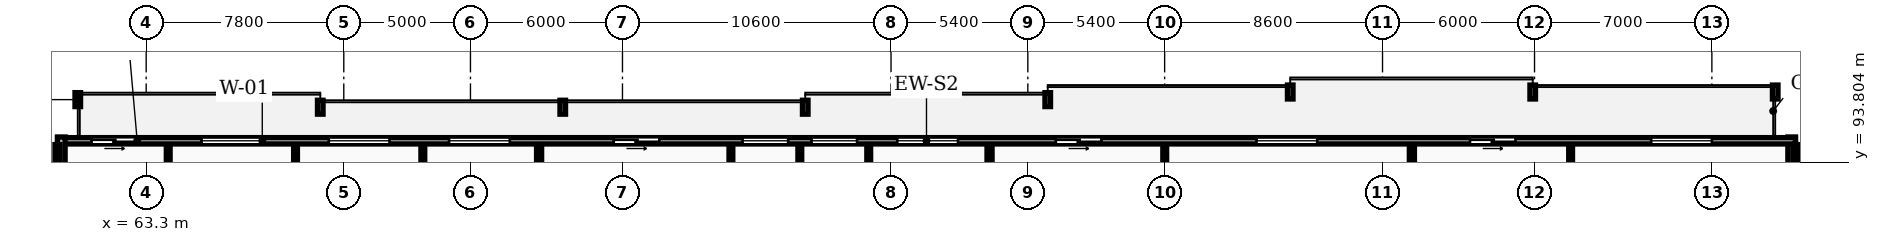
"""IFC4 building model, lengths in metres.
Left out: names, types, materials, properties, quantities, classifications, styles, units other than length and angle.
Written with IfcOpenShell. Run it as: python <this file> out.ifc"""

import sys

from ifc_helpers import new_model, si_unit, direction, frame, frame_2d, origin, place, context, subcontext, project, spatial, rectangle, extrude, element, fill, save


model = new_model("IFC4")
c1 = context("Model", 3, precision=1e-05, world=origin(), true_north=direction((0.0, 1.0)))
c2 = subcontext(c1, "Body", "Model", "MODEL_VIEW")
j1 = project(units=[si_unit("LENGTHUNIT", "METRE"), si_unit("PLANEANGLEUNIT", "RADIAN")], contexts=[c1])
p1 = place(None, origin())
s1 = spatial("IfcSite", under=j1, at=p1, CompositionType="ELEMENT")
p2 = place(p1, origin())
s2 = spatial("IfcBuilding", under=s1, at=p2, CompositionType="ELEMENT")
p3 = place(p2, frame((0.0, 0.0, 249.35)))
s3 = spatial("IfcBuildingStorey", under=s2, at=p3, CompositionType="ELEMENT", Elevation=249.35)
p4 = place(p3, frame((128.25, 91.2, 0.0), z_axis=(0.0, 0.0, 1.0), x_axis=(0.0, 1.0, 0.0)))
e1 = element("IfcWall", 1, at=p4, inside=s3, PredefinedType="STANDARD", context=c2, shape_type="SweptSolid", body=[
    extrude(rectangle(XDim=3.6, YDim=0.3, at=frame_2d((1.8, 0.0))), origin(), (0.0, 0.0, 1.0), 3.17),
])
p5 = place(p3, frame((128.4, 94.65, 0.0), z_axis=(0.0, 0.0, 1.0), x_axis=(-1.0, 0.0, 0.0)))
e2 = element("IfcWall", 2, at=p5, inside=s3, PredefinedType="STANDARD", context=c2, shape_type="SweptSolid", body=[
    extrude(rectangle(XDim=68.6, YDim=0.25, at=frame_2d((34.3, 0.0))), origin(), (0.0, 0.0, 1.0), 3.17),
])
p6 = place(p5, frame((60.518, 0.0, 0.85)))
e3 = element("IfcOpeningElement", 3, at=p6, cuts=e2, PredefinedType="OPENING", context=c2, shape_type="SweptSolid", body=[
    extrude(rectangle(XDim=2.4, YDim=1.9, at=frame_2d((1.2, 0.95))), frame((0.0, 0.135, 0.0), z_axis=(0.0, -1.0, 0.0), x_axis=(1.0, 0.0, 0.0)), (0.0, 0.0, 1.0), 0.27),
])
p7 = place(p5, frame((55.492, 0.0, 0.85)))
e4 = element("IfcOpeningElement", 4, at=p7, cuts=e2, PredefinedType="OPENING", context=c2, shape_type="SweptSolid", body=[
    extrude(rectangle(XDim=2.4, YDim=1.9, at=frame_2d((1.2, 0.95))), frame((0.0, 0.135, 0.0), z_axis=(0.0, -1.0, 0.0), x_axis=(1.0, 0.0, 0.0)), (0.0, 0.0, 1.0), 0.27),
])
p8 = place(p5, frame((65.455, 0.0, 0.0)))
e5 = element("IfcOpeningElement", 5, at=p8, cuts=e2, PredefinedType="OPENING", context=c2, shape_type="SweptSolid", body=[
    extrude(rectangle(XDim=1.8, YDim=2.2, at=frame_2d((0.9, 1.1))), frame((0.0, 0.135, 0.0), z_axis=(0.0, -1.0, 0.0), x_axis=(1.0, 0.0, 0.0)), (0.0, 0.0, 1.0), 0.27),
])
p9 = place(p5, frame((50.746, 0.0, 0.85)))
e6 = element("IfcOpeningElement", 6, at=p9, cuts=e2, PredefinedType="OPENING", context=c2, shape_type="SweptSolid", body=[
    extrude(rectangle(XDim=2.4, YDim=1.9, at=frame_2d((1.2, 0.95))), frame((0.0, 0.135, 0.0), z_axis=(0.0, -1.0, 0.0), x_axis=(1.0, 0.0, 0.0)), (0.0, 0.0, 1.0), 0.27),
])
p10 = place(p5, frame((39.76, 0.0, 0.85)))
e7 = element("IfcOpeningElement", 7, at=p10, cuts=e2, PredefinedType="OPENING", context=c2, shape_type="SweptSolid", body=[
    extrude(rectangle(XDim=1.8, YDim=1.8, at=frame_2d((0.9, 0.9))), frame((0.0, 0.135, 0.0), z_axis=(0.0, -1.0, 0.0), x_axis=(1.0, 0.0, 0.0)), (0.0, 0.0, 1.0), 0.27),
])
p11 = place(p5, frame((37.04, 0.0, 0.85)))
e8 = element("IfcOpeningElement", 8, at=p11, cuts=e2, PredefinedType="OPENING", context=c2, shape_type="SweptSolid", body=[
    extrude(rectangle(XDim=1.8, YDim=1.8, at=frame_2d((0.9, 0.9))), frame((0.0, 0.135, 0.0), z_axis=(0.0, -1.0, 0.0), x_axis=(1.0, 0.0, 0.0)), (0.0, 0.0, 1.0), 0.27),
])
p12 = place(p5, frame((44.845, 0.0, 0.0)))
e9 = element("IfcOpeningElement", 9, at=p12, cuts=e2, PredefinedType="OPENING", context=c2, shape_type="SweptSolid", body=[
    extrude(rectangle(XDim=1.8, YDim=2.2, at=frame_2d((0.9, 1.1))), frame((0.0, 0.135, 0.0), z_axis=(0.0, -1.0, 0.0), x_axis=(1.0, 0.0, 0.0)), (0.0, 0.0, 1.0), 0.27),
])
p13 = place(p5, frame((33.056, 0.0, 0.85)))
e10 = element("IfcOpeningElement", 10, at=p13, cuts=e2, PredefinedType="OPENING", context=c2, shape_type="SweptSolid", body=[
    extrude(rectangle(XDim=2.4, YDim=1.9, at=frame_2d((1.2, 0.95))), frame((0.0, 0.135, 0.0), z_axis=(0.0, -1.0, 0.0), x_axis=(1.0, 0.0, 0.0)), (0.0, 0.0, 1.0), 0.27),
])
p14 = place(p5, frame((27.394, 0.0, 0.0)))
e11 = element("IfcOpeningElement", 11, at=p14, cuts=e2, PredefinedType="OPENING", context=c2, shape_type="SweptSolid", body=[
    extrude(rectangle(XDim=1.8, YDim=2.2, at=frame_2d((0.9, 1.1))), frame((0.0, 0.135, 0.0), z_axis=(0.0, -1.0, 0.0), x_axis=(1.0, 0.0, 0.0)), (0.0, 0.0, 1.0), 0.27),
])
p15 = place(p5, frame((18.879, 0.0, 0.85)))
e12 = element("IfcOpeningElement", 12, at=p15, cuts=e2, PredefinedType="OPENING", context=c2, shape_type="SweptSolid", body=[
    extrude(rectangle(XDim=2.4, YDim=1.9, at=frame_2d((1.2, 0.95))), frame((0.0, 0.135, 0.0), z_axis=(0.0, -1.0, 0.0), x_axis=(1.0, 0.0, 0.0)), (0.0, 0.0, 1.0), 0.27),
])
p16 = place(p5, frame((11.048, 0.0, 0.0)))
e13 = element("IfcOpeningElement", 13, at=p16, cuts=e2, PredefinedType="OPENING", context=c2, shape_type="SweptSolid", body=[
    extrude(rectangle(XDim=1.8, YDim=2.2, at=frame_2d((0.9, 1.1))), frame((0.0, 0.135, 0.0), z_axis=(0.0, -1.0, 0.0), x_axis=(1.0, 0.0, 0.0)), (0.0, 0.0, 1.0), 0.27),
])
p17 = place(p5, frame((3.298, 0.0, 0.85)))
e14 = element("IfcOpeningElement", 14, at=p17, cuts=e2, PredefinedType="OPENING", context=c2, shape_type="SweptSolid", body=[
    extrude(rectangle(XDim=2.4, YDim=1.9, at=frame_2d((1.2, 0.95))), frame((0.0, 0.135, 0.0), z_axis=(0.0, -1.0, 0.0), x_axis=(1.0, 0.0, 0.0)), (0.0, 0.0, 1.0), 0.27),
])
p18 = place(p3, frame((59.95, 94.8, 0.0), z_axis=(0.0, 0.0, 1.0), x_axis=(0.0, -1.0, 0.0)))
e15 = element("IfcWall", 15, at=p18, inside=s3, PredefinedType="STANDARD", context=c2, shape_type="SweptSolid", body=[
    extrude(rectangle(XDim=3.6, YDim=0.3, at=frame_2d((1.8, 0.0))), origin(), (0.0, 0.0, 1.0), 3.17),
])
for number, where, z_axis, x_axis in (
    (16, (59.8, 70.18, 0.0), (0.0, 0.0, 1.0), (0.0, 1.0, 0.0)),
    (17, (128.4, 70.18, 0.0), (0.0, 0.0, 1.0), (0.0, 1.0, 0.0)),
):
    element("IfcWall", number, at=place(p3, frame(where, z_axis=z_axis, x_axis=x_axis)), inside=s3, PredefinedType="PARTITIONING", context=c2, shape_type="SweptSolid", body=[
        extrude(rectangle(XDim=24.32, YDim=0.2, at=frame_2d((12.16, 0.0))), origin(), (0.0, 0.0, 1.0), 2.477),
    ])
p19 = place(p3, frame((78.809, 70.18, 0.0), z_axis=(0.0, 0.0, 1.0), x_axis=(0.0, 1.0, 0.0)))
e18 = element("IfcWall", 18, at=p19, inside=s3, PredefinedType="PARTITIONING", context=c2, shape_type="SweptSolid", body=[
    extrude(rectangle(XDim=24.32, YDim=0.2, at=frame_2d((12.16, 0.0))), origin(), (0.0, 0.0, 1.0), 3.17),
])
p20 = place(p3, frame((69.195, 90.03, 0.0), z_axis=(0.0, 0.0, 1.0), x_axis=(0.0, 1.0, 0.0)))
e19 = element("IfcWall", 19, at=p20, inside=s3, PredefinedType="PARTITIONING", context=c2, shape_type="SweptSolid", body=[
    extrude(rectangle(XDim=4.47, YDim=0.15, at=frame_2d((2.235, 0.0))), origin(), (0.0, 0.0, 1.0), 3.17),
])
p21 = place(p3, frame((64.17, 84.89, 0.0), z_axis=(0.0, 0.0, 1.0), x_axis=(0.0, 1.0, 0.0)))
e20 = element("IfcWall", 20, at=p21, inside=s3, PredefinedType="PARTITIONING", context=c2, shape_type="SweptSolid", body=[
    extrude(rectangle(XDim=9.61, YDim=0.15, at=frame_2d((4.805, 0.0))), origin(), (0.0, 0.0, 1.0), 3.17),
])
p22 = place(p21, frame((3.82, 0.0, 0.0)))
e21 = element("IfcOpeningElement", 21, at=p22, cuts=e20, PredefinedType="OPENING", context=c2, shape_type="SweptSolid", body=[
    extrude(rectangle(XDim=0.92, YDim=2.08, at=frame_2d((0.46, 1.04))), frame((0.0, 0.085, 0.0), z_axis=(0.0, -1.0, 0.0), x_axis=(1.0, 0.0, 0.0)), (0.0, 0.0, 1.0), 0.17),
])
p23 = place(p3, frame((74.22, 87.51, 0.0), z_axis=(0.0, 0.0, 1.0), x_axis=(0.0, 1.0, 0.0)))
e22 = element("IfcWall", 22, at=p23, inside=s3, PredefinedType="PARTITIONING", context=c2, shape_type="SweptSolid", body=[
    extrude(rectangle(XDim=6.99, YDim=0.15, at=frame_2d((3.495, 0.0))), origin(), (0.0, 0.0, 1.0), 3.17),
])
p24 = place(p23, frame((1.2, 0.0, 0.0)))
e23 = element("IfcOpeningElement", 23, at=p24, cuts=e22, PredefinedType="OPENING", context=c2, shape_type="SweptSolid", body=[
    extrude(rectangle(XDim=0.92, YDim=2.08, at=frame_2d((0.46, 1.04))), frame((0.0, 0.085, 0.0), z_axis=(0.0, -1.0, 0.0), x_axis=(1.0, 0.0, 0.0)), (0.0, 0.0, 1.0), 0.17),
])
p25 = place(p3, frame((96.589, 70.18, 0.0), z_axis=(0.0, 0.0, 1.0), x_axis=(0.0, 1.0, 0.0)))
e24 = element("IfcWall", 24, at=p25, inside=s3, PredefinedType="PARTITIONING", context=c2, shape_type="SweptSolid", body=[
    extrude(rectangle(XDim=24.32, YDim=0.2, at=frame_2d((12.16, 0.0))), origin(), (0.0, 0.0, 1.0), 3.17),
])
p26 = place(p3, frame((89.1, 90.03, 0.0), z_axis=(0.0, 0.0, 1.0), x_axis=(0.0, 1.0, 0.0)))
e25 = element("IfcWall", 25, at=p26, inside=s3, PredefinedType="PARTITIONING", context=c2, shape_type="SweptSolid", body=[
    extrude(rectangle(XDim=4.47, YDim=0.15, at=frame_2d((2.235, 0.0))), origin(), (0.0, 0.0, 1.0), 3.17),
])
p27 = place(p3, frame((86.38, 84.89, 0.0), z_axis=(0.0, 0.0, 1.0), x_axis=(0.0, 1.0, 0.0)))
e26 = element("IfcWall", 26, at=p27, inside=s3, PredefinedType="PARTITIONING", context=c2, shape_type="SweptSolid", body=[
    extrude(rectangle(XDim=9.61, YDim=0.15, at=frame_2d((4.805, 0.0))), origin(), (0.0, 0.0, 1.0), 3.17),
])
p28 = place(p27, frame((3.82, 0.0, 0.0)))
e27 = element("IfcOpeningElement", 27, at=p28, cuts=e26, PredefinedType="OPENING", context=c2, shape_type="SweptSolid", body=[
    extrude(rectangle(XDim=0.92, YDim=2.08, at=frame_2d((0.46, 1.04))), frame((0.0, 0.085, 0.0), z_axis=(0.0, -1.0, 0.0), x_axis=(1.0, 0.0, 0.0)), (0.0, 0.0, 1.0), 0.17),
])
p29 = place(p3, frame((91.82, 87.4, 0.0), z_axis=(0.0, 0.0, 1.0), x_axis=(0.0, 1.0, 0.0)))
e28 = element("IfcWall", 28, at=p29, inside=s3, PredefinedType="PARTITIONING", context=c2, shape_type="SweptSolid", body=[
    extrude(rectangle(XDim=7.1, YDim=0.15, at=frame_2d((3.55, 0.0))), origin(), (0.0, 0.0, 1.0), 3.17),
])
p30 = place(p29, frame((1.31, 0.0, 0.0)))
e29 = element("IfcOpeningElement", 29, at=p30, cuts=e28, PredefinedType="OPENING", context=c2, shape_type="SweptSolid", body=[
    extrude(rectangle(XDim=0.92, YDim=2.08, at=frame_2d((0.46, 1.04))), frame((0.0, 0.085, 0.0), z_axis=(0.0, -1.0, 0.0), x_axis=(1.0, 0.0, 0.0)), (0.0, 0.0, 1.0), 0.17),
])
p31 = place(p3, frame((113.259, 70.18, 0.0), z_axis=(0.0, 0.0, 1.0), x_axis=(0.0, 1.0, 0.0)))
e30 = element("IfcWall", 30, at=p31, inside=s3, PredefinedType="PARTITIONING", context=c2, shape_type="SweptSolid", body=[
    extrude(rectangle(XDim=24.32, YDim=0.2, at=frame_2d((12.16, 0.0))), origin(), (0.0, 0.0, 1.0), 3.17),
])
for number, where, z_axis, x_axis in (
    (31, (103.504, 90.03, 0.0), (0.0, 0.0, 1.0), (0.0, 1.0, 0.0)),
    (32, (119.524, 90.03, 0.0), (0.0, 0.0, 1.0), (0.0, 1.0, 0.0)),
):
    element("IfcWall", number, at=place(p3, frame(where, z_axis=z_axis, x_axis=x_axis)), inside=s3, PredefinedType="PARTITIONING", context=c2, shape_type="SweptSolid", body=[
        extrude(rectangle(XDim=4.47, YDim=0.15, at=frame_2d((2.235, 0.0))), origin(), (0.0, 0.0, 1.0), 3.17),
    ])
p32 = place(p6, origin())
e33 = element("IfcWindow", 33, at=p32, inside=s3, PartitioningType="DOUBLE_PANEL_VERTICAL", PredefinedType="WINDOW", context=c2, shape_type="SweptSolid", body=[
    extrude(rectangle(XDim=2.4, YDim=1.9, at=frame_2d((1.2, 0.95))), frame((0.0, 0.03, 0.0), z_axis=(0.0, -1.0, 0.0), x_axis=(1.0, 0.0, 0.0)), (0.0, 0.0, 1.0), 0.06),
])
fill(e3, e33)
p33 = place(p7, origin())
e34 = element("IfcWindow", 34, at=p33, inside=s3, PartitioningType="DOUBLE_PANEL_VERTICAL", PredefinedType="WINDOW", context=c2, shape_type="SweptSolid", body=[
    extrude(rectangle(XDim=2.4, YDim=1.9, at=frame_2d((1.2, 0.95))), frame((0.0, 0.03, 0.0), z_axis=(0.0, -1.0, 0.0), x_axis=(1.0, 0.0, 0.0)), (0.0, 0.0, 1.0), 0.06),
])
fill(e4, e34)
p34 = place(p8, origin())
e35 = element("IfcDoor", 35, at=p34, inside=s3, OperationType="SLIDING_TO_LEFT", PredefinedType="DOOR", context=c2, shape_type="SweptSolid", body=[
    extrude(rectangle(XDim=1.8, YDim=2.2, at=frame_2d((0.9, 1.1))), frame((0.0, 0.025, 0.0), z_axis=(0.0, -1.0, 0.0), x_axis=(1.0, 0.0, 0.0)), (0.0, 0.0, 1.0), 0.05),
])
fill(e5, e35)
p35 = place(p9, origin())
e36 = element("IfcWindow", 36, at=p35, inside=s3, PartitioningType="DOUBLE_PANEL_VERTICAL", PredefinedType="WINDOW", context=c2, shape_type="SweptSolid", body=[
    extrude(rectangle(XDim=2.4, YDim=1.9, at=frame_2d((1.2, 0.95))), frame((0.0, 0.03, 0.0), z_axis=(0.0, -1.0, 0.0), x_axis=(1.0, 0.0, 0.0)), (0.0, 0.0, 1.0), 0.06),
])
fill(e6, e36)
p36 = place(p10, origin())
e37 = element("IfcWindow", 37, at=p36, inside=s3, PartitioningType="SINGLE_PANEL", PredefinedType="WINDOW", context=c2, shape_type="SweptSolid", body=[
    extrude(rectangle(XDim=1.8, YDim=1.8, at=frame_2d((0.9, 0.9))), frame((0.0, 0.03, 0.0), z_axis=(0.0, -1.0, 0.0), x_axis=(1.0, 0.0, 0.0)), (0.0, 0.0, 1.0), 0.06),
])
fill(e7, e37)
p37 = place(p11, origin())
e38 = element("IfcWindow", 38, at=p37, inside=s3, PartitioningType="SINGLE_PANEL", PredefinedType="WINDOW", context=c2, shape_type="SweptSolid", body=[
    extrude(rectangle(XDim=1.8, YDim=1.8, at=frame_2d((0.9, 0.9))), frame((0.0, 0.03, 0.0), z_axis=(0.0, -1.0, 0.0), x_axis=(1.0, 0.0, 0.0)), (0.0, 0.0, 1.0), 0.06),
])
fill(e8, e38)
p38 = place(p12, origin())
e39 = element("IfcDoor", 39, at=p38, inside=s3, OperationType="SLIDING_TO_LEFT", PredefinedType="DOOR", context=c2, shape_type="SweptSolid", body=[
    extrude(rectangle(XDim=1.8, YDim=2.2, at=frame_2d((0.9, 1.1))), frame((0.0, 0.025, 0.0), z_axis=(0.0, -1.0, 0.0), x_axis=(1.0, 0.0, 0.0)), (0.0, 0.0, 1.0), 0.05),
])
fill(e9, e39)
p39 = place(p13, origin())
e40 = element("IfcWindow", 40, at=p39, inside=s3, PartitioningType="DOUBLE_PANEL_VERTICAL", PredefinedType="WINDOW", context=c2, shape_type="SweptSolid", body=[
    extrude(rectangle(XDim=2.4, YDim=1.9, at=frame_2d((1.2, 0.95))), frame((0.0, 0.03, 0.0), z_axis=(0.0, -1.0, 0.0), x_axis=(1.0, 0.0, 0.0)), (0.0, 0.0, 1.0), 0.06),
])
fill(e10, e40)
p40 = place(p14, origin())
e41 = element("IfcDoor", 41, at=p40, inside=s3, OperationType="SLIDING_TO_LEFT", PredefinedType="DOOR", context=c2, shape_type="SweptSolid", body=[
    extrude(rectangle(XDim=1.8, YDim=2.2, at=frame_2d((0.9, 1.1))), frame((0.0, 0.025, 0.0), z_axis=(0.0, -1.0, 0.0), x_axis=(1.0, 0.0, 0.0)), (0.0, 0.0, 1.0), 0.05),
])
fill(e11, e41)
p41 = place(p15, origin())
e42 = element("IfcWindow", 42, at=p41, inside=s3, PartitioningType="DOUBLE_PANEL_VERTICAL", PredefinedType="WINDOW", context=c2, shape_type="SweptSolid", body=[
    extrude(rectangle(XDim=2.4, YDim=1.9, at=frame_2d((1.2, 0.95))), frame((0.0, 0.03, 0.0), z_axis=(0.0, -1.0, 0.0), x_axis=(1.0, 0.0, 0.0)), (0.0, 0.0, 1.0), 0.06),
])
fill(e12, e42)
p42 = place(p16, origin())
e43 = element("IfcDoor", 43, at=p42, inside=s3, OperationType="SLIDING_TO_LEFT", PredefinedType="DOOR", context=c2, shape_type="SweptSolid", body=[
    extrude(rectangle(XDim=1.8, YDim=2.2, at=frame_2d((0.9, 1.1))), frame((0.0, 0.025, 0.0), z_axis=(0.0, -1.0, 0.0), x_axis=(1.0, 0.0, 0.0)), (0.0, 0.0, 1.0), 0.05),
])
fill(e13, e43)
p43 = place(p17, origin())
e44 = element("IfcWindow", 44, at=p43, inside=s3, PartitioningType="DOUBLE_PANEL_VERTICAL", PredefinedType="WINDOW", context=c2, shape_type="SweptSolid", body=[
    extrude(rectangle(XDim=2.4, YDim=1.9, at=frame_2d((1.2, 0.95))), frame((0.0, 0.03, 0.0), z_axis=(0.0, -1.0, 0.0), x_axis=(1.0, 0.0, 0.0)), (0.0, 0.0, 1.0), 0.06),
])
fill(e14, e44)
save(model, sys.argv[1])
